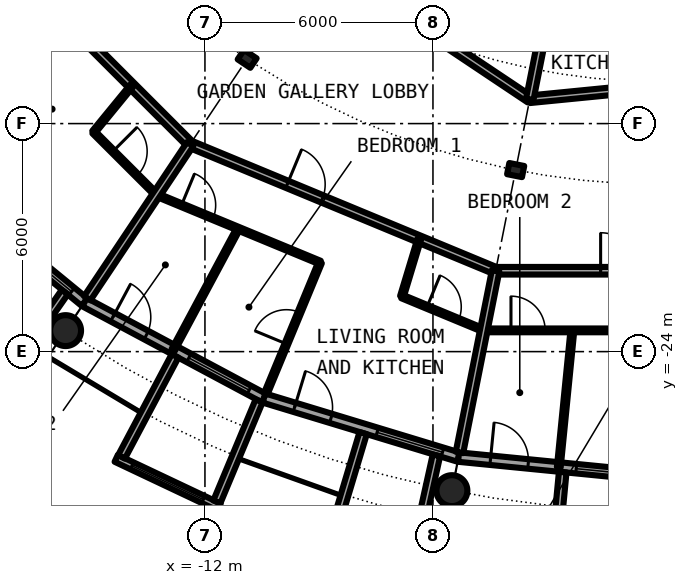
"""IFC4 building model, lengths in metres.
Left out: names, types, materials, properties, quantities, classifications, styles, units other than length and angle.
Written with IfcOpenShell. Run it as: python <this file> out.ifc"""

import sys

from ifc_helpers import new_model, si_unit, direction, frame, frame_2d, origin, origin_2d, place, context, subcontext, project, spatial, rectangle, circle, hollow_circle, i_section, extrude, element, fill, save


model = new_model("IFC4")
c1 = context("Model", 3, precision=1e-05, world=origin(), true_north=direction((0.0, 1.0)))
c2 = subcontext(c1, "Body", "Model", "MODEL_VIEW")
j1 = project(units=[si_unit("LENGTHUNIT", "METRE"), si_unit("PLANEANGLEUNIT", "RADIAN")], contexts=[c1])
p1 = place(None, origin())
s1 = spatial("IfcSite", under=j1, at=p1, CompositionType="ELEMENT")
p2 = place(p1, origin())
s2 = spatial("IfcBuilding", under=s1, at=p2, CompositionType="ELEMENT")
p3 = place(p2, frame((0.0, 0.0, 212.7)))
s3 = spatial("IfcBuildingStorey", under=s2, at=p3, CompositionType="ELEMENT", Elevation=212.7)
for number, where, z_axis, x_axis in (
    (1, (-15.667, -23.448, 0.0), (0.0, 0.0, 1.0), (1.0, 0.0, 0.0)),
    (2, (-5.501, -27.658, 0.0), (0.0, 0.0, 1.0), (1.0, 0.0, 0.0)),
):
    element("IfcColumn", number, at=place(p3, frame(where, z_axis=z_axis, x_axis=x_axis)), inside=s3, PredefinedType="COLUMN", context=c2, shape_type="SweptSolid", body=[
        extrude(hollow_circle(Radius=0.406, WallThickness=0.03, at=origin_2d()), origin(), (0.0, 0.0, 1.0), 3.05),
    ])
for number, where, z_axis, x_axis in (
    (3, (-10.889, -16.297, 0.0), (0.0, 0.0, 1.0), (-0.556, -0.831, 0.0)),
    (4, (-3.824, -19.223, 0.0), (0.0, 0.0, 1.0), (-0.195, -0.981, 0.0)),
):
    element("IfcColumn", number, at=place(p3, frame(where, z_axis=z_axis, x_axis=x_axis)), inside=s3, PredefinedType="COLUMN", context=c2, shape_type="SweptSolid", body=[
        extrude(i_section(OverallWidth=0.3, OverallDepth=0.4, WebThickness=0.013, FlangeThickness=0.024, FilletRadius=0.027, at=origin_2d()), origin(), (0.0, 0.0, 1.0), 3.05),
    ])
p4 = place(p3, frame((-19.304, -19.304, 0.0), z_axis=(0.0, 0.0, 1.0), x_axis=(0.773019449054, -0.634382322723, 0.0)))
e5 = element("IfcWall", 5, at=p4, inside=s3, PredefinedType="SOLIDWALL", context=c2, shape_type="SweptSolid", body=[
    extrude(rectangle(XDim=5.352, YDim=0.25, at=frame_2d((2.676, 0.0))), origin(), (0.0, 0.0, 1.0), 2.7),
])
p5 = place(p4, frame((0.841, 0.0, 0.0)))
e6 = element("IfcOpeningElement", 6, at=p5, cuts=e5, PredefinedType="OPENING", context=c2, shape_type="SweptSolid", body=[
    extrude(rectangle(XDim=1.0, YDim=2.2, at=frame_2d((0.5, 1.1))), frame((0.0, 0.135, 0.0), z_axis=(0.0, -1.0, 0.0), x_axis=(1.0, 0.0, 0.0)), (0.0, 0.0, 1.0), 0.27),
])
p6 = place(p4, frame((3.111, 0.0, 0.3)))
e7 = element("IfcOpeningElement", 7, at=p6, cuts=e5, PredefinedType="OPENING", context=c2, shape_type="SweptSolid", body=[
    extrude(rectangle(XDim=1.8, YDim=2.1, at=frame_2d((0.9, 1.05))), frame((0.0, 0.135, 0.0), z_axis=(0.0, -1.0, 0.0), x_axis=(1.0, 0.0, 0.0)), (0.0, 0.0, 1.0), 0.27),
])
p7 = place(p3, frame((-15.688, -22.433, -0.03), z_axis=(0.0, 0.0, 1.0), x_axis=(-0.573260687834, -0.819373043115, 0.0)))
e8 = element("IfcWall", 8, at=p7, inside=s3, PredefinedType="SOLIDWALL", context=c2, shape_type="SweptSolid", body=[
    extrude(rectangle(XDim=2.925, YDim=0.2, at=frame_2d((1.463, 0.0))), origin(), (0.0, 0.0, 1.0), 2.73),
])
p8 = place(p3, frame((-15.167, -22.699, 0.0), z_axis=(0.0, 0.0, 1.0), x_axis=(0.881915646801, -0.471407246368, 0.0)))
e9 = element("IfcWall", 9, at=p8, inside=s3, PredefinedType="SOLIDWALL", context=c2, shape_type="SweptSolid", body=[
    extrude(rectangle(XDim=5.352, YDim=0.25, at=frame_2d((2.676, 0.0))), origin(), (0.0, 0.0, 1.0), 2.7),
])
p9 = place(p8, frame((0.841, 0.0, 0.0)))
e10 = element("IfcOpeningElement", 10, at=p9, cuts=e9, PredefinedType="OPENING", context=c2, shape_type="SweptSolid", body=[
    extrude(rectangle(XDim=1.0, YDim=2.2, at=frame_2d((0.5, 1.1))), frame((0.0, 0.135, 0.0), z_axis=(0.0, -1.0, 0.0), x_axis=(1.0, 0.0, 0.0)), (0.0, 0.0, 1.0), 0.27),
])
p10 = place(p8, frame((3.111, 0.0, 0.3)))
e11 = element("IfcOpeningElement", 11, at=p10, cuts=e9, PredefinedType="OPENING", context=c2, shape_type="SweptSolid", body=[
    extrude(rectangle(XDim=1.8, YDim=2.1, at=frame_2d((0.9, 1.05))), frame((0.0, 0.135, 0.0), z_axis=(0.0, -1.0, 0.0), x_axis=(1.0, 0.0, 0.0)), (0.0, 0.0, 1.0), 0.27),
])
p11 = place(p3, frame((-14.335, -26.808, -0.03), z_axis=(0.0, 0.0, 1.0), x_axis=(0.904000060331, -0.427532327342, 0.0)))
e12 = element("IfcWall", 12, at=p11, inside=s3, PredefinedType="SOLIDWALL", context=c2, shape_type="SweptSolid", body=[
    extrude(rectangle(XDim=2.993, YDim=0.2, at=frame_2d((1.497, 0.0))), origin(), (0.0, 0.0, 1.0), 2.73),
])
p12 = place(p11, frame((0.457, 0.0, 0.33)))
e13 = element("IfcOpeningElement", 13, at=p12, cuts=e12, PredefinedType="OPENING", context=c2, shape_type="SweptSolid", body=[
    extrude(circle(Radius=1.04, at=frame_2d((1.04, 1.04))), frame((0.0, 0.11, 0.0), z_axis=(0.0, -1.0, 0.0), x_axis=(1.0, 0.0, 0.0)), (0.0, 0.0, 1.0), 0.22),
])
p13 = place(p3, frame((-12.787, -24.113, -0.03), z_axis=(0.0, 0.0, 1.0), x_axis=(-0.468365282436, -0.883534924159, 0.0)))
e14 = element("IfcWall", 14, at=p13, inside=s3, PredefinedType="SOLIDWALL", context=c2, shape_type="SweptSolid", body=[
    extrude(rectangle(XDim=3.006, YDim=0.2, at=frame_2d((1.503, 0.0))), origin(), (0.0, 0.0, 1.0), 2.73),
])
p14 = place(p3, frame((-10.575, -25.295, -0.03), z_axis=(0.0, 0.0, 1.0), x_axis=(-0.385697364644, -0.922625353492, 0.0)))
e15 = element("IfcWall", 15, at=p14, inside=s3, PredefinedType="SOLIDWALL", context=c2, shape_type="SweptSolid", body=[
    extrude(rectangle(XDim=2.883, YDim=0.2, at=frame_2d((1.442, 0.0))), origin(), (0.0, 0.0, 1.0), 2.73),
])
p15 = place(p3, frame((-10.447, -25.222, 0.0), z_axis=(0.0, 0.0, 1.0), x_axis=(0.956965678721, -0.290201119486, 0.0)))
e16 = element("IfcWall", 16, at=p15, inside=s3, PredefinedType="SOLIDWALL", context=c2, shape_type="SweptSolid", body=[
    extrude(rectangle(XDim=5.351, YDim=0.25, at=frame_2d((2.676, 0.0))), origin(), (0.0, 0.0, 1.0), 2.7),
])
p16 = place(p15, frame((0.841, 0.0, 0.0)))
e17 = element("IfcOpeningElement", 17, at=p16, cuts=e16, PredefinedType="OPENING", context=c2, shape_type="SweptSolid", body=[
    extrude(rectangle(XDim=1.0, YDim=2.2, at=frame_2d((0.5, 1.1))), frame((0.0, 0.135, 0.0), z_axis=(0.0, -1.0, 0.0), x_axis=(1.0, 0.0, 0.0)), (0.0, 0.0, 1.0), 0.27),
])
p17 = place(p15, frame((3.111, 0.0, 0.3)))
e18 = element("IfcOpeningElement", 18, at=p17, cuts=e16, PredefinedType="OPENING", context=c2, shape_type="SweptSolid", body=[
    extrude(rectangle(XDim=1.8, YDim=2.1, at=frame_2d((0.9, 1.05))), frame((0.0, 0.135, 0.0), z_axis=(0.0, -1.0, 0.0), x_axis=(1.0, 0.0, 0.0)), (0.0, 0.0, 1.0), 0.27),
])
p18 = place(p3, frame((-7.837, -26.144, -0.03), z_axis=(0.0, 0.0, 1.0), x_axis=(-0.287064767992, -0.957911174889, 0.0)))
e19 = element("IfcWall", 19, at=p18, inside=s3, PredefinedType="SOLIDWALL", context=c2, shape_type="SweptSolid", body=[
    extrude(rectangle(XDim=3.006, YDim=0.2, at=frame_2d((1.503, 0.0))), origin(), (0.0, 0.0, 1.0), 2.73),
])
p19 = place(p3, frame((-5.909, -26.729, -0.03), z_axis=(0.0, 0.0, 1.0), x_axis=(-0.216409053917, -0.976302781612, 0.0)))
e20 = element("IfcWall", 20, at=p19, inside=s3, PredefinedType="SOLIDWALL", context=c2, shape_type="SweptSolid", body=[
    extrude(rectangle(XDim=2.925, YDim=0.2, at=frame_2d((1.463, 0.0))), origin(), (0.0, 0.0, 1.0), 2.73),
])
p20 = place(p3, frame((-5.326, -26.775, 0.0), z_axis=(0.0, 0.0, 1.0), x_axis=(0.995173996315, -0.098126026407, 0.0)))
e21 = element("IfcWall", 21, at=p20, inside=s3, PredefinedType="SOLIDWALL", context=c2, shape_type="SweptSolid", body=[
    extrude(rectangle(XDim=5.352, YDim=0.25, at=frame_2d((2.676, 0.0))), origin(), (0.0, 0.0, 1.0), 2.7),
])
p21 = place(p20, frame((0.841, 0.0, 0.0)))
e22 = element("IfcOpeningElement", 22, at=p21, cuts=e21, PredefinedType="OPENING", context=c2, shape_type="SweptSolid", body=[
    extrude(rectangle(XDim=1.0, YDim=2.2, at=frame_2d((0.5, 1.1))), frame((0.0, 0.135, 0.0), z_axis=(0.0, -1.0, 0.0), x_axis=(1.0, 0.0, 0.0)), (0.0, 0.0, 1.0), 0.27),
])
p22 = place(p20, frame((3.111, 0.0, 0.3)))
e23 = element("IfcOpeningElement", 23, at=p22, cuts=e21, PredefinedType="OPENING", context=c2, shape_type="SweptSolid", body=[
    extrude(rectangle(XDim=1.8, YDim=2.1, at=frame_2d((0.9, 1.05))), frame((0.0, 0.135, 0.0), z_axis=(0.0, -1.0, 0.0), x_axis=(1.0, 0.0, 0.0)), (0.0, 0.0, 1.0), 0.27),
])
p23 = place(p3, frame((-2.586, -27.171, -0.03), z_axis=(0.0, 0.0, 1.0), x_axis=(-0.094548432284, -0.995520262954, 0.0)))
e24 = element("IfcWall", 24, at=p23, inside=s3, PredefinedType="SOLIDWALL", context=c2, shape_type="SweptSolid", body=[
    extrude(rectangle(XDim=3.006, YDim=0.2, at=frame_2d((1.503, 0.0))), origin(), (0.0, 0.0, 1.0), 2.73),
])
p24 = place(p3, frame((-14.927, -18.224, 0.0), z_axis=(0.0, 0.0, 1.0), x_axis=(0.707316201218, -0.706897299114, 0.0)))
e25 = element("IfcWall", 25, at=p24, inside=s3, PredefinedType="PARTITIONING", context=c2, shape_type="SweptSolid", body=[
    extrude(rectangle(XDim=2.331, YDim=0.1, at=frame_2d((1.166, 0.0))), origin(), (0.0, 0.0, 1.0), 2.7),
])
p25 = place(p24, frame((0.716, 0.0, 0.0)))
e26 = element("IfcOpeningElement", 26, at=p25, cuts=e25, PredefinedType="OPENING", context=c2, shape_type="SweptSolid", body=[
    extrude(rectangle(XDim=0.9, YDim=2.3, at=frame_2d((0.45, 1.15))), frame((0.0, 0.06, 0.0), z_axis=(0.0, -1.0, 0.0), x_axis=(1.0, 0.0, 0.0)), (0.0, 0.0, 1.0), 0.12),
])
p26 = place(p3, frame((-13.278, -19.873, 0.0), z_axis=(0.0, 0.0, 1.0), x_axis=(0.923920484476, -0.38258455061, 0.0)))
e27 = element("IfcWall", 27, at=p26, inside=s3, PredefinedType="PARTITIONING", context=c2, shape_type="SweptSolid", body=[
    extrude(rectangle(XDim=4.663, YDim=0.1, at=frame_2d((2.332, 0.0))), origin(), (0.0, 0.0, 1.0), 2.7),
])
p27 = place(p26, frame((0.715, 0.0, 0.0)))
e28 = element("IfcOpeningElement", 28, at=p27, cuts=e27, PredefinedType="OPENING", context=c2, shape_type="SweptSolid", body=[
    extrude(rectangle(XDim=0.9, YDim=2.3, at=frame_2d((0.45, 1.15))), frame((0.0, 0.06, 0.0), z_axis=(0.0, -1.0, 0.0), x_axis=(1.0, 0.0, 0.0)), (0.0, 0.0, 1.0), 0.12),
])
p28 = place(p3, frame((-6.817, -22.549, 0.0), z_axis=(0.0, 0.0, 1.0), x_axis=(0.923923664861, -0.382576870068, 0.0)))
e29 = element("IfcWall", 29, at=p28, inside=s3, PredefinedType="PARTITIONING", context=c2, shape_type="SweptSolid", body=[
    extrude(rectangle(XDim=2.331, YDim=0.1, at=frame_2d((1.166, 0.0))), origin(), (0.0, 0.0, 1.0), 2.7),
])
p29 = place(p28, frame((0.716, 0.0, 0.0)))
e30 = element("IfcOpeningElement", 30, at=p29, cuts=e29, PredefinedType="OPENING", context=c2, shape_type="SweptSolid", body=[
    extrude(rectangle(XDim=0.9, YDim=2.3, at=frame_2d((0.45, 1.15))), frame((0.0, 0.06, 0.0), z_axis=(0.0, -1.0, 0.0), x_axis=(1.0, 0.0, 0.0)), (0.0, 0.0, 1.0), 0.12),
])
p30 = place(p3, frame((-4.663, -23.441, 0.0), z_axis=(0.0, 0.0, 1.0), x_axis=(1.0, 0.0, 0.0)))
e31 = element("IfcWall", 31, at=p30, inside=s3, PredefinedType="PARTITIONING", context=c2, shape_type="SweptSolid", body=[
    extrude(rectangle(XDim=4.663, YDim=0.1, at=frame_2d((2.332, 0.0))), origin(), (0.0, 0.0, 1.0), 2.7),
])
p31 = place(p30, frame((0.716, 0.0, 0.0)))
e32 = element("IfcOpeningElement", 32, at=p31, cuts=e31, PredefinedType="OPENING", context=c2, shape_type="SweptSolid", body=[
    extrude(rectangle(XDim=0.9, YDim=2.3, at=frame_2d((0.45, 1.15))), frame((0.0, 0.06, 0.0), z_axis=(0.0, -1.0, 0.0), x_axis=(1.0, 0.0, 0.0)), (0.0, 0.0, 1.0), 0.12),
])
p32 = place(p3, frame((-18.542, -12.389, 0.0), z_axis=(0.0, 0.0, 1.0), x_axis=(0.707106781187, -0.707106781187, 0.0)))
e33 = element("IfcWall", 33, at=p32, inside=s3, PredefinedType="PARTITIONING", context=c2, shape_type="SweptSolid", body=[
    extrude(rectangle(XDim=8.702, YDim=0.2, at=frame_2d((4.351, 0.0))), origin(), (0.0, 0.0, 1.0), 2.7),
])
p33 = place(p32, frame((2.763, 0.0, 0.0)))
e34 = element("IfcOpeningElement", 34, at=p33, cuts=e33, PredefinedType="OPENING", context=c2, shape_type="SweptSolid", body=[
    extrude(rectangle(XDim=1.0, YDim=2.3, at=frame_2d((0.5, 1.15))), frame((0.0, 0.11, 0.0), z_axis=(0.0, -1.0, 0.0), x_axis=(1.0, 0.0, 0.0)), (0.0, 0.0, 1.0), 0.22),
])
p34 = place(p3, frame((-12.389, -18.542, 0.0), z_axis=(0.0, 0.0, 1.0), x_axis=(0.923867858178, -0.382711615483, 0.0)))
e35 = element("IfcWall", 35, at=p34, inside=s3, PredefinedType="PARTITIONING", context=c2, shape_type="SweptSolid", body=[
    extrude(rectangle(XDim=8.709, YDim=0.2, at=frame_2d((4.354, 0.0))), origin(), (0.0, 0.0, 1.0), 2.7),
])
p35 = place(p34, frame((2.763, 0.0, 0.0)))
e36 = element("IfcOpeningElement", 36, at=p35, cuts=e35, PredefinedType="OPENING", context=c2, shape_type="SweptSolid", body=[
    extrude(rectangle(XDim=1.0, YDim=2.3, at=frame_2d((0.5, 1.15))), frame((0.0, 0.11, 0.0), z_axis=(0.0, -1.0, 0.0), x_axis=(1.0, 0.0, 0.0)), (0.0, 0.0, 1.0), 0.22),
])
p36 = place(p3, frame((-4.351, -21.872, 0.0), z_axis=(0.0, 0.0, 1.0), x_axis=(1.0, 0.0, 0.0)))
e37 = element("IfcWall", 37, at=p36, inside=s3, PredefinedType="PARTITIONING", context=c2, shape_type="SweptSolid", body=[
    extrude(rectangle(XDim=8.702, YDim=0.2, at=frame_2d((4.351, 0.0))), origin(), (0.0, 0.0, 1.0), 2.7),
])
p37 = place(p36, frame((2.763, 0.0, 0.0)))
e38 = element("IfcOpeningElement", 38, at=p37, cuts=e37, PredefinedType="OPENING", context=c2, shape_type="SweptSolid", body=[
    extrude(rectangle(XDim=1.0, YDim=2.3, at=frame_2d((0.5, 1.15))), frame((0.0, 0.11, 0.0), z_axis=(0.0, -1.0, 0.0), x_axis=(1.0, 0.0, 0.0)), (0.0, 0.0, 1.0), 0.22),
])
p38 = place(p3, frame((-3.454, -17.36, 0.0), z_axis=(0.0, 0.0, 1.0), x_axis=(0.995189328429, 0.097970406658, 0.0)))
e39 = element("IfcWall", 39, at=p38, inside=s3, PredefinedType="PARTITIONING", context=c2, shape_type="SweptSolid", body=[
    extrude(rectangle(XDim=10.28, YDim=0.2, at=frame_2d((5.14, 0.0))), origin(), (0.0, 0.0, 1.0), 2.7),
])
p39 = place(p38, frame((4.639, 0.0, 0.0)))
e40 = element("IfcOpeningElement", 40, at=p39, cuts=e39, PredefinedType="OPENING", context=c2, shape_type="SweptSolid", body=[
    extrude(rectangle(XDim=1.0, YDim=2.3, at=frame_2d((0.5, 1.15))), frame((0.0, 0.11, 0.0), z_axis=(0.0, -1.0, 0.0), x_axis=(1.0, 0.0, 0.0)), (0.0, 0.0, 1.0), 0.22),
])
p40 = place(p3, frame((-14.717, -9.834, 0.0), z_axis=(0.0, 0.0, 1.0), x_axis=(0.831492679744, -0.555535708603, 0.0)))
e41 = element("IfcWall", 41, at=p40, inside=s3, PredefinedType="PARTITIONING", context=c2, shape_type="SweptSolid", body=[
    extrude(rectangle(XDim=13.549, YDim=0.2, at=frame_2d((6.775, 0.0))), origin(), (0.0, 0.0, 1.0), 2.7),
])
p41 = place(p40, frame((7.966, 0.0, 0.0)))
e42 = element("IfcOpeningElement", 42, at=p41, cuts=e41, PredefinedType="OPENING", context=c2, shape_type="SweptSolid", body=[
    extrude(rectangle(XDim=1.0, YDim=2.3, at=frame_2d((0.5, 1.15))), frame((0.0, 0.11, 0.0), z_axis=(0.0, -1.0, 0.0), x_axis=(1.0, 0.0, 0.0)), (0.0, 0.0, 1.0), 0.22),
])
for number, where, z_axis, x_axis in (
    (43, (-14.927, -18.224, 0.0), (0.0, 0.0, 1.0), (0.634, 0.773, 0.0)),
    (44, (-6.817, -22.549, 0.0), (0.0, 0.0, 1.0), (0.29, 0.957, 0.0)),
):
    element("IfcWall", number, at=place(p3, frame(where, z_axis=z_axis, x_axis=x_axis)), inside=s3, PredefinedType="PARTITIONING", context=c2, shape_type="SweptSolid", body=[
        extrude(rectangle(XDim=1.578, YDim=0.1, at=frame_2d((0.789, 0.0))), origin(), (0.0, 0.0, 1.0), 2.7),
    ])
p42 = place(p3, frame((-15.097, -22.596, 0.0), z_axis=(0.0, 0.0, 1.0), x_axis=(0.555462686211, 0.831541462723, 0.0)))
e45 = element("IfcWall", 45, at=p42, inside=s3, PredefinedType="PARTITIONING", context=c2, shape_type="SweptSolid", body=[
    extrude(rectangle(XDim=4.875, YDim=0.2, at=frame_2d((2.438, 0.0))), origin(), (0.0, 0.0, 1.0), 2.7),
])
p43 = place(p3, frame((-12.833, -23.954, 0.0), z_axis=(0.0, 0.0, 1.0), x_axis=(0.472212052488, 0.881484984265, 0.0)))
e46 = element("IfcWall", 46, at=p43, inside=s3, PredefinedType="PARTITIONING", context=c2, shape_type="SweptSolid", body=[
    extrude(rectangle(XDim=3.619, YDim=0.1, at=frame_2d((1.81, 0.0))), origin(), (0.0, 0.0, 1.0), 2.7),
])
p44 = place(p3, frame((-10.399, -25.106, 0.0), z_axis=(0.0, 0.0, 1.0), x_axis=(0.382669377748, 0.923885353999, 0.0)))
e47 = element("IfcWall", 47, at=p44, inside=s3, PredefinedType="PARTITIONING", context=c2, shape_type="SweptSolid", body=[
    extrude(rectangle(XDim=3.734, YDim=0.1, at=frame_2d((1.867, 0.0))), origin(), (0.0, 0.0, 1.0), 2.7),
])
p45 = place(p44, frame((1.417, 0.0, 0.0)))
e48 = element("IfcOpeningElement", 48, at=p45, cuts=e47, PredefinedType="OPENING", context=c2, shape_type="SweptSolid", body=[
    extrude(rectangle(XDim=0.9, YDim=2.3, at=frame_2d((0.45, 1.15))), frame((0.0, 0.06, 0.0), z_axis=(0.0, -1.0, 0.0), x_axis=(1.0, 0.0, 0.0)), (0.0, 0.0, 1.0), 0.12),
])
p46 = place(p3, frame((-5.302, -26.653, 0.0), z_axis=(0.0, 0.0, 1.0), x_axis=(0.195075825861, 0.980788163756, 0.0)))
e49 = element("IfcWall", 49, at=p46, inside=s3, PredefinedType="PARTITIONING", context=c2, shape_type="SweptSolid", body=[
    extrude(rectangle(XDim=4.875, YDim=0.2, at=frame_2d((2.438, 0.0))), origin(), (0.0, 0.0, 1.0), 2.7),
])
p47 = place(p3, frame((-3.453, -17.36, 0.0), z_axis=(0.0, 0.0, 1.0), x_axis=(0.19507162238, 0.980788999807, 0.0)))
e50 = element("IfcWall", 50, at=p47, inside=s3, PredefinedType="PARTITIONING", context=c2, shape_type="SweptSolid", body=[
    extrude(rectangle(XDim=9.98, YDim=0.2, at=frame_2d((4.99, 0.0))), origin(), (0.0, 0.0, 1.0), 2.7),
])
p48 = place(p3, frame((-2.689, -27.042, 0.0), z_axis=(0.0, 0.0, 1.0), x_axis=(0.098902534616, 0.995097125233, 0.0)))
e51 = element("IfcWall", 51, at=p48, inside=s3, PredefinedType="PARTITIONING", context=c2, shape_type="SweptSolid", body=[
    extrude(rectangle(XDim=3.619, YDim=0.1, at=frame_2d((1.81, 0.0))), origin(), (0.0, 0.0, 1.0), 2.7),
])
p49 = place(p6, origin())
e52 = element("IfcWindow", 52, at=p49, inside=s3, PartitioningType="SINGLE_PANEL", PredefinedType="WINDOW", context=c2, shape_type="SweptSolid", body=[
    extrude(rectangle(XDim=1.8, YDim=2.1, at=frame_2d((0.9, 1.05))), frame((0.0, 0.03, 0.0), z_axis=(0.0, -1.0, 0.0), x_axis=(1.0, 0.0, 0.0)), (0.0, 0.0, 1.0), 0.06),
])
fill(e7, e52)
p50 = place(p9, origin())
e53 = element("IfcDoor", 53, at=p50, inside=s3, OperationType="SINGLE_SWING_LEFT", PredefinedType="DOOR", context=c2, shape_type="SweptSolid", body=[
    extrude(rectangle(XDim=1.0, YDim=2.2, at=frame_2d((0.5, 1.1))), frame((0.0, 0.025, 0.0), z_axis=(0.0, -1.0, 0.0), x_axis=(1.0, 0.0, 0.0)), (0.0, 0.0, 1.0), 0.05),
])
fill(e10, e53)
p51 = place(p10, origin())
e54 = element("IfcWindow", 54, at=p51, inside=s3, PartitioningType="SINGLE_PANEL", PredefinedType="WINDOW", context=c2, shape_type="SweptSolid", body=[
    extrude(rectangle(XDim=1.8, YDim=2.1, at=frame_2d((0.9, 1.05))), frame((0.0, 0.03, 0.0), z_axis=(0.0, -1.0, 0.0), x_axis=(1.0, 0.0, 0.0)), (0.0, 0.0, 1.0), 0.06),
])
fill(e11, e54)
p52 = place(p12, origin())
e55 = element("IfcWindow", 55, at=p52, inside=s3, PartitioningType="SINGLE_PANEL", PredefinedType="WINDOW", context=c2, shape_type="SweptSolid", body=[
    extrude(circle(Radius=1.04, at=frame_2d((1.04, 1.04))), frame((0.0, 0.03, 0.0), z_axis=(0.0, -1.0, 0.0), x_axis=(1.0, 0.0, 0.0)), (0.0, 0.0, 1.0), 0.06),
])
fill(e13, e55)
p53 = place(p16, origin())
e56 = element("IfcDoor", 56, at=p53, inside=s3, OperationType="SINGLE_SWING_LEFT", PredefinedType="DOOR", context=c2, shape_type="SweptSolid", body=[
    extrude(rectangle(XDim=1.0, YDim=2.2, at=frame_2d((0.5, 1.1))), frame((0.0, 0.025, 0.0), z_axis=(0.0, -1.0, 0.0), x_axis=(1.0, 0.0, 0.0)), (0.0, 0.0, 1.0), 0.05),
])
fill(e17, e56)
p54 = place(p17, origin())
e57 = element("IfcWindow", 57, at=p54, inside=s3, PartitioningType="SINGLE_PANEL", PredefinedType="WINDOW", context=c2, shape_type="SweptSolid", body=[
    extrude(rectangle(XDim=1.8, YDim=2.1, at=frame_2d((0.9, 1.05))), frame((0.0, 0.03, 0.0), z_axis=(0.0, -1.0, 0.0), x_axis=(1.0, 0.0, 0.0)), (0.0, 0.0, 1.0), 0.06),
])
fill(e18, e57)
p55 = place(p21, origin())
e58 = element("IfcDoor", 58, at=p55, inside=s3, OperationType="SINGLE_SWING_LEFT", PredefinedType="DOOR", context=c2, shape_type="SweptSolid", body=[
    extrude(rectangle(XDim=1.0, YDim=2.2, at=frame_2d((0.5, 1.1))), frame((0.0, 0.025, 0.0), z_axis=(0.0, -1.0, 0.0), x_axis=(1.0, 0.0, 0.0)), (0.0, 0.0, 1.0), 0.05),
])
fill(e22, e58)
p56 = place(p22, origin())
e59 = element("IfcWindow", 59, at=p56, inside=s3, PartitioningType="SINGLE_PANEL", PredefinedType="WINDOW", context=c2, shape_type="SweptSolid", body=[
    extrude(rectangle(XDim=1.8, YDim=2.1, at=frame_2d((0.9, 1.05))), frame((0.0, 0.03, 0.0), z_axis=(0.0, -1.0, 0.0), x_axis=(1.0, 0.0, 0.0)), (0.0, 0.0, 1.0), 0.06),
])
fill(e23, e59)
p57 = place(p25, origin())
e60 = element("IfcDoor", 60, at=p57, inside=s3, OperationType="SINGLE_SWING_LEFT", PredefinedType="DOOR", context=c2, shape_type="SweptSolid", body=[
    extrude(rectangle(XDim=0.9, YDim=2.3, at=frame_2d((0.45, 1.15))), frame((0.0, 0.025, 0.0), z_axis=(0.0, -1.0, 0.0), x_axis=(1.0, 0.0, 0.0)), (0.0, 0.0, 1.0), 0.05),
])
fill(e26, e60)
p58 = place(p35, origin())
e61 = element("IfcDoor", 61, at=p58, inside=s3, OperationType="SINGLE_SWING_LEFT", PredefinedType="DOOR", context=c2, shape_type="SweptSolid", body=[
    extrude(rectangle(XDim=1.0, YDim=2.3, at=frame_2d((0.5, 1.15))), frame((0.0, 0.025, 0.0), z_axis=(0.0, -1.0, 0.0), x_axis=(1.0, 0.0, 0.0)), (0.0, 0.0, 1.0), 0.05),
])
fill(e36, e61)
p59 = place(p29, origin())
e62 = element("IfcDoor", 62, at=p59, inside=s3, OperationType="SINGLE_SWING_LEFT", PredefinedType="DOOR", context=c2, shape_type="SweptSolid", body=[
    extrude(rectangle(XDim=0.9, YDim=2.3, at=frame_2d((0.45, 1.15))), frame((0.0, 0.025, 0.0), z_axis=(0.0, -1.0, 0.0), x_axis=(1.0, 0.0, 0.0)), (0.0, 0.0, 1.0), 0.05),
])
fill(e30, e62)
p60 = place(p45, origin())
e63 = element("IfcDoor", 63, at=p60, inside=s3, OperationType="SINGLE_SWING_RIGHT", PredefinedType="DOOR", context=c2, shape_type="SweptSolid", body=[
    extrude(rectangle(XDim=0.9, YDim=2.3, at=frame_2d((0.45, 1.15))), frame((0.0, 0.025, 0.0), z_axis=(0.0, -1.0, 0.0), x_axis=(1.0, 0.0, 0.0)), (0.0, 0.0, 1.0), 0.05),
])
fill(e48, e63)
p61 = place(p27, origin())
e64 = element("IfcDoor", 64, at=p61, inside=s3, OperationType="SINGLE_SWING_LEFT", PredefinedType="DOOR", context=c2, shape_type="SweptSolid", body=[
    extrude(rectangle(XDim=0.9, YDim=2.3, at=frame_2d((0.45, 1.15))), frame((0.0, 0.025, 0.0), z_axis=(0.0, -1.0, 0.0), x_axis=(1.0, 0.0, 0.0)), (0.0, 0.0, 1.0), 0.05),
])
fill(e28, e64)
p62 = place(p37, origin())
e65 = element("IfcDoor", 65, at=p62, inside=s3, OperationType="SINGLE_SWING_LEFT", PredefinedType="DOOR", context=c2, shape_type="SweptSolid", body=[
    extrude(rectangle(XDim=1.0, YDim=2.3, at=frame_2d((0.5, 1.15))), frame((0.0, 0.025, 0.0), z_axis=(0.0, -1.0, 0.0), x_axis=(1.0, 0.0, 0.0)), (0.0, 0.0, 1.0), 0.05),
])
fill(e38, e65)
p63 = place(p31, origin())
e66 = element("IfcDoor", 66, at=p63, inside=s3, OperationType="SINGLE_SWING_LEFT", PredefinedType="DOOR", context=c2, shape_type="SweptSolid", body=[
    extrude(rectangle(XDim=0.9, YDim=2.3, at=frame_2d((0.45, 1.15))), frame((0.0, 0.025, 0.0), z_axis=(0.0, -1.0, 0.0), x_axis=(1.0, 0.0, 0.0)), (0.0, 0.0, 1.0), 0.05),
])
fill(e32, e66)
save(model, sys.argv[1])
